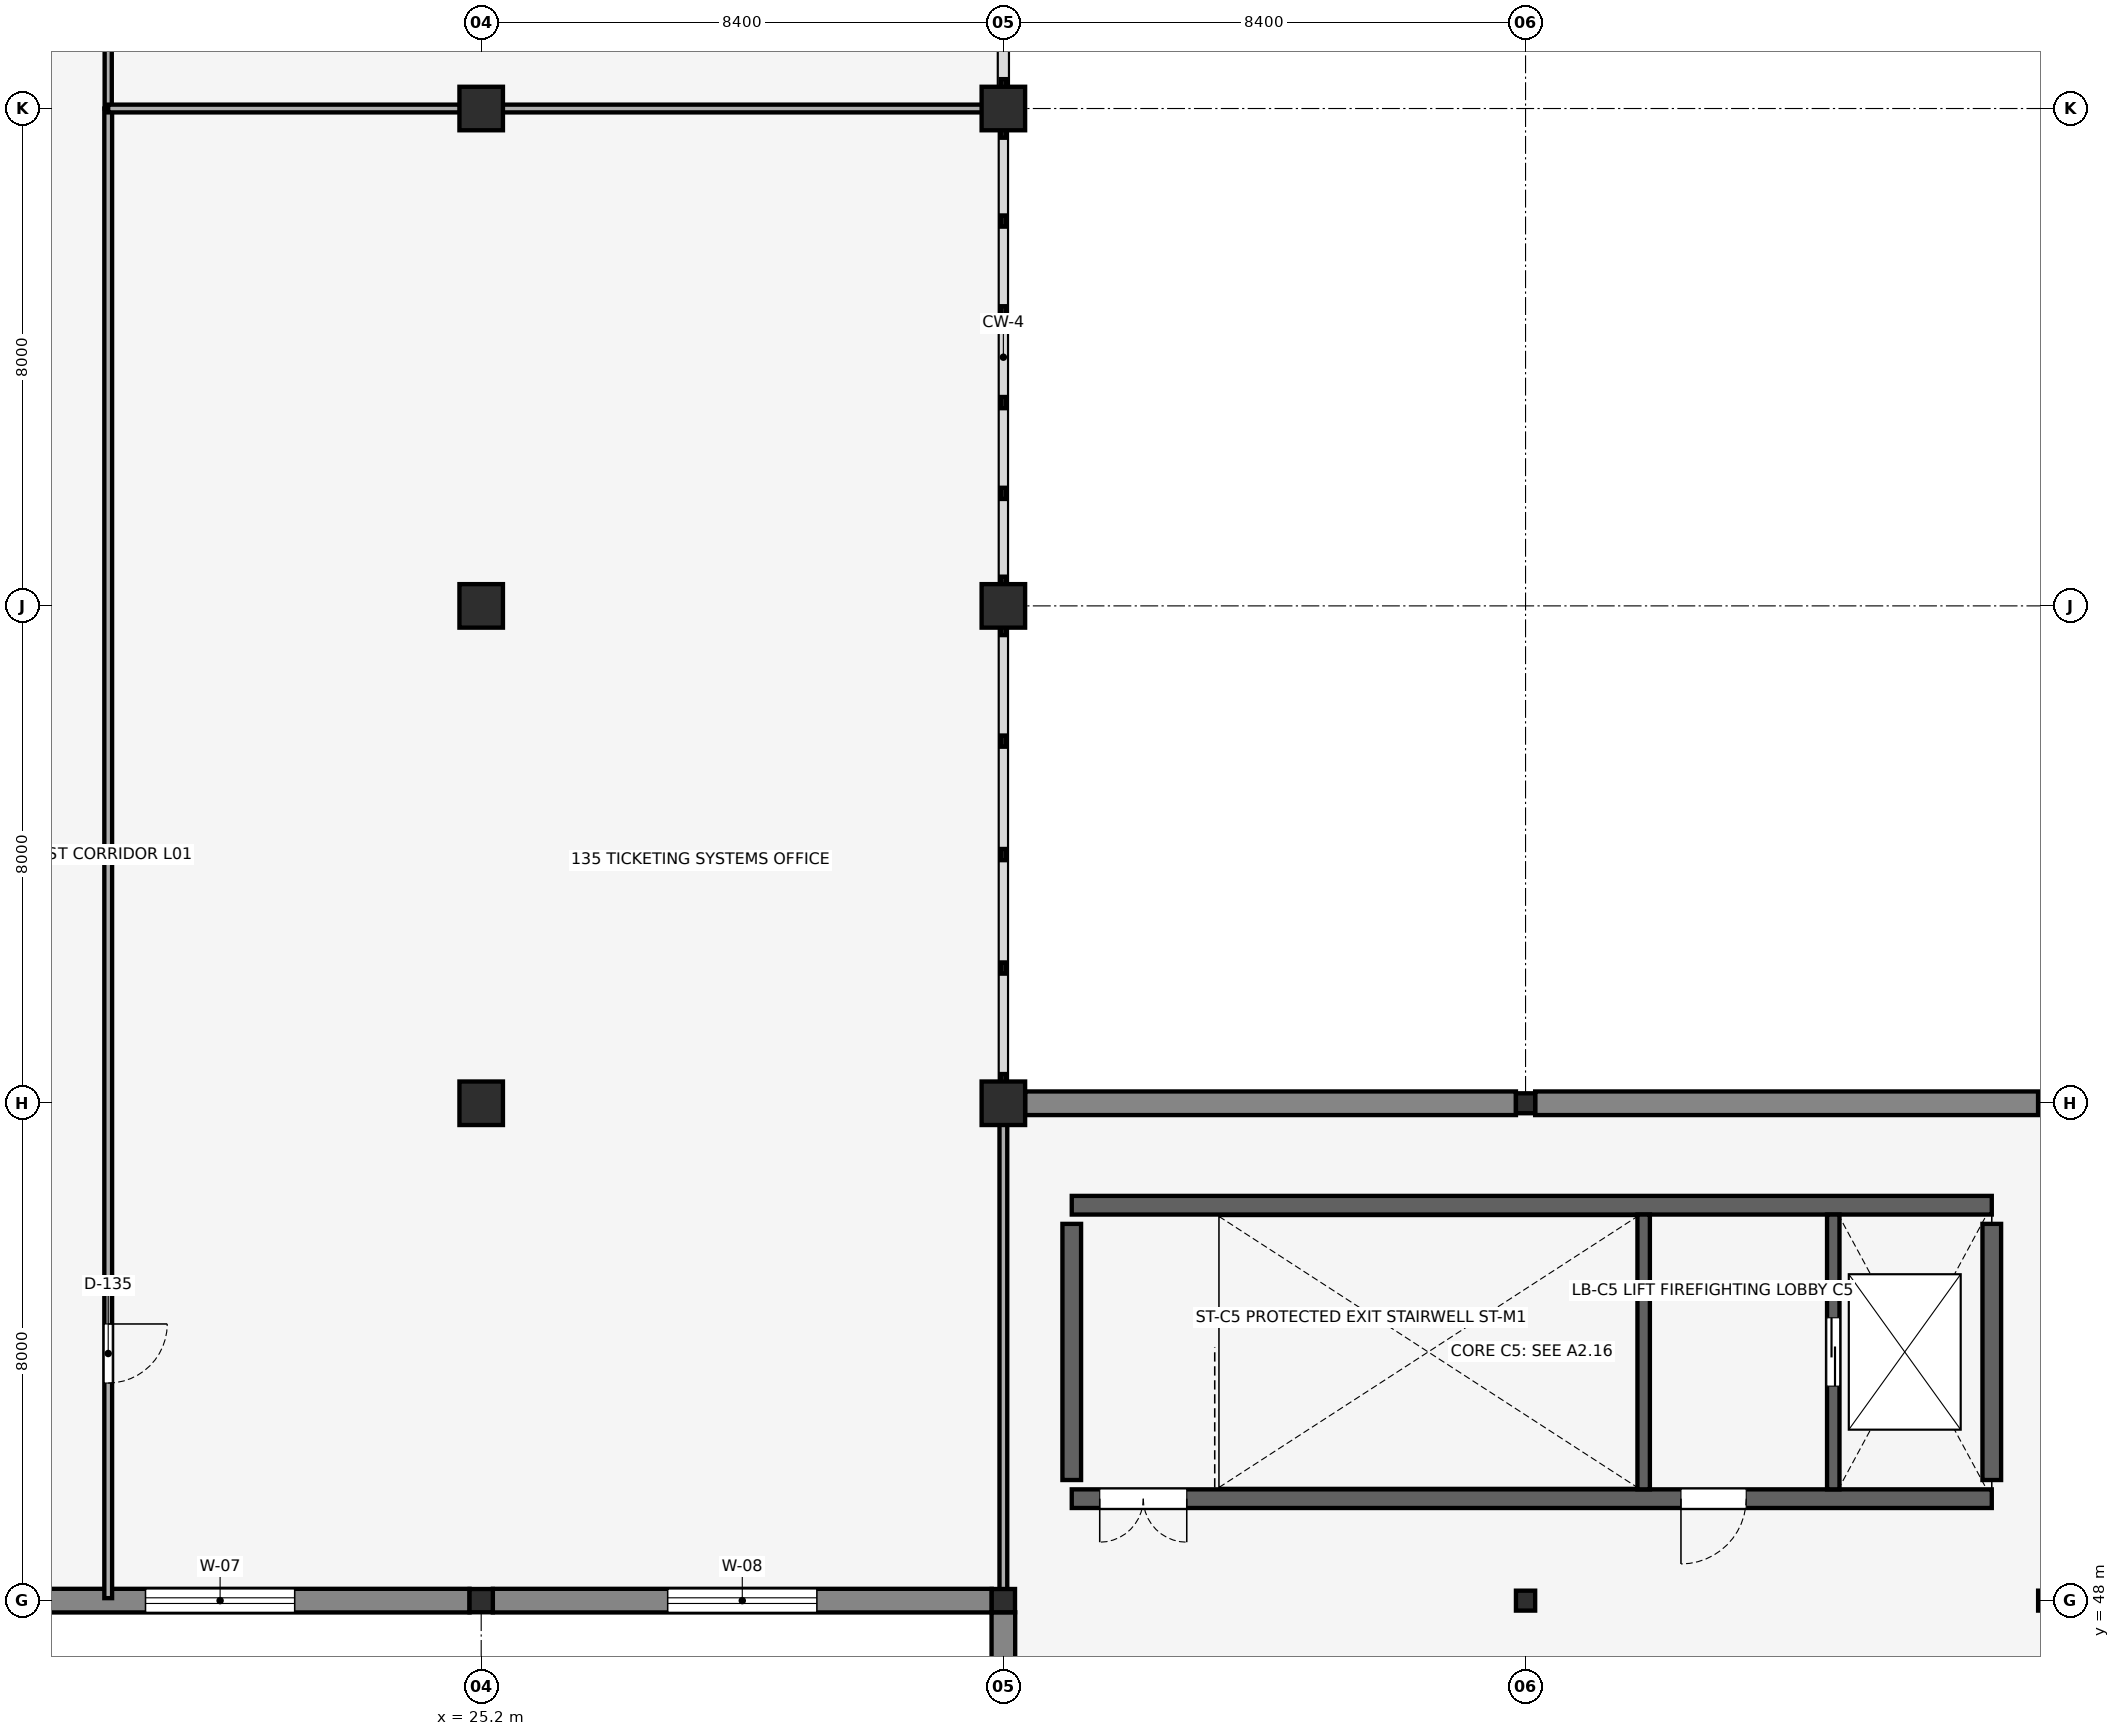
"""IFC4 building model, lengths in metres.
Left out: names, types, materials, properties, quantities, classifications, styles, units other than length and angle.
Written with IfcOpenShell. Run it as: python <this file> out.ifc"""

import sys

from ifc_helpers import new_model, si_unit, direction, frame, frame_2d, origin, origin_2d, place, context, subcontext, project, spatial, rectangle, i_section, extrude, element, fill, save


model = new_model("IFC4")
c1 = context("Model", 3, precision=1e-05, world=origin(), true_north=direction((0.0, 1.0)))
c2 = subcontext(c1, "Body", "Model", "MODEL_VIEW")
j1 = project(units=[si_unit("LENGTHUNIT", "METRE"), si_unit("PLANEANGLEUNIT", "RADIAN")], contexts=[c1])
p1 = place(None, origin())
s1 = spatial("IfcSite", under=j1, at=p1, CompositionType="ELEMENT")
p2 = place(p1, origin())
s2 = spatial("IfcBuilding", under=s1, at=p2, CompositionType="ELEMENT")
p3 = place(p2, frame((0.0, 0.0, 5.44)))
s3 = spatial("IfcBuildingStorey", under=s2, at=p3, CompositionType="ELEMENT", Elevation=5.44)
p4 = place(p3, frame((34.7, 49.64, 0.0), z_axis=(0.0, 0.0, 1.0), x_axis=(1.0, 0.0, 0.0)))
e1 = element("IfcWall", 1, at=p4, inside=s3, PredefinedType="SHEAR", context=c2, shape_type="SweptSolid", body=[
    extrude(rectangle(XDim=14.8, YDim=0.3, at=frame_2d((7.4, 0.0))), origin(), (0.0, 0.0, 1.0), 3.8),
])
p5 = place(p4, frame((1.85, 0.0, 0.0), z_axis=(0.0, 0.0, 1.0), x_axis=(-1.0, 0.0, 0.0)))
e2 = element("IfcOpeningElement", 2, at=p5, cuts=e1, PredefinedType="OPENING", context=c2, shape_type="SweptSolid", body=[
    extrude(rectangle(XDim=1.4, YDim=2.15, at=frame_2d((0.7, 1.075))), frame((0.0, 0.16, 0.0), z_axis=(0.0, -1.0, 0.0), x_axis=(1.0, 0.0, 0.0)), (0.0, 0.0, 1.0), 0.32),
])
p6 = place(p4, frame((10.85, 0.0, 0.0), z_axis=(0.0, 0.0, 1.0), x_axis=(-1.0, 0.0, 0.0)))
e3 = element("IfcOpeningElement", 3, at=p6, cuts=e1, PredefinedType="OPENING", context=c2, shape_type="SweptSolid", body=[
    extrude(rectangle(XDim=1.05, YDim=2.15, at=frame_2d((0.525, 1.075))), frame((0.0, 0.16, 0.0), z_axis=(0.0, -1.0, 0.0), x_axis=(1.0, 0.0, 0.0)), (0.0, 0.0, 1.0), 0.32),
])
p7 = place(p3, frame((34.7, 54.36, 0.0), z_axis=(0.0, 0.0, 1.0), x_axis=(1.0, 0.0, 0.0)))
e4 = element("IfcWall", 4, at=p7, inside=s3, PredefinedType="SHEAR", context=c2, shape_type="SweptSolid", body=[
    extrude(rectangle(XDim=14.8, YDim=0.3, at=frame_2d((7.4, 0.0))), origin(), (0.0, 0.0, 1.0), 3.8),
])
for number, where, z_axis, x_axis in (
    (5, (34.7, 49.94, 0.0), (0.0, 0.0, 1.0), (0.0, 1.0, 0.0)),
    (6, (49.5, 49.94, 0.0), (0.0, 0.0, 1.0), (0.0, 1.0, 0.0)),
):
    element("IfcWall", number, at=place(p3, frame(where, z_axis=z_axis, x_axis=x_axis)), inside=s3, PredefinedType="SHEAR", context=c2, shape_type="SweptSolid", body=[
        extrude(rectangle(XDim=4.12, YDim=0.3, at=frame_2d((2.06, 0.0))), origin(), (0.0, 0.0, 1.0), 3.8),
    ])
p8 = place(p3, frame((25.2, 48.0, 0.0), z_axis=(0.0, 0.0, 1.0), x_axis=(1.0, 0.0, 0.0)))
e7 = element("IfcColumn", 7, at=p8, inside=s3, PredefinedType="COLUMN", context=c2, shape_type="SweptSolid", body=[
    extrude(i_section(OverallWidth=0.375, OverallDepth=0.375, WebThickness=0.017, FlangeThickness=0.027, FilletRadius=0.015, at=origin_2d()), origin(), (0.0, 0.0, 1.0), 3.8),
])
for number, where, z_axis, x_axis in (
    (8, (25.2, 56.0, 0.0), (0.0, 0.0, 1.0), (1.0, 0.0, 0.0)),
    (9, (25.2, 64.0, 0.0), (0.0, 0.0, 1.0), (1.0, 0.0, 0.0)),
    (10, (25.2, 72.0, 0.0), (0.0, 0.0, 1.0), (1.0, 0.0, 0.0)),
):
    element("IfcColumn", number, at=place(p3, frame(where, z_axis=z_axis, x_axis=x_axis)), inside=s3, PredefinedType="COLUMN", context=c2, shape_type="SweptSolid", body=[
        extrude(rectangle(XDim=0.7, YDim=0.7, at=origin_2d()), origin(), (0.0, 0.0, 1.0), 3.8),
    ])
p9 = place(p3, frame((33.6, 48.0, 0.0), z_axis=(0.0, 0.0, 1.0), x_axis=(1.0, 0.0, 0.0)))
e11 = element("IfcColumn", 11, at=p9, inside=s3, PredefinedType="COLUMN", context=c2, shape_type="SweptSolid", body=[
    extrude(i_section(OverallWidth=0.375, OverallDepth=0.375, WebThickness=0.017, FlangeThickness=0.027, FilletRadius=0.015, at=origin_2d()), origin(), (0.0, 0.0, 1.0), 3.8),
])
for number, where, z_axis, x_axis in (
    (12, (33.6, 56.0, 0.0), (0.0, 0.0, 1.0), (1.0, 0.0, 0.0)),
    (13, (33.6, 64.0, 0.0), (0.0, 0.0, 1.0), (1.0, 0.0, 0.0)),
    (14, (33.6, 72.0, 0.0), (0.0, 0.0, 1.0), (1.0, 0.0, 0.0)),
):
    element("IfcColumn", number, at=place(p3, frame(where, z_axis=z_axis, x_axis=x_axis)), inside=s3, PredefinedType="COLUMN", context=c2, shape_type="SweptSolid", body=[
        extrude(rectangle(XDim=0.7, YDim=0.7, at=origin_2d()), origin(), (0.0, 0.0, 1.0), 3.8),
    ])
for number, where, z_axis, x_axis in (
    (15, (42.0, 48.0, 0.0), (0.0, 0.0, 1.0), (1.0, 0.0, 0.0)),
    (16, (42.0, 56.0, 0.0), (0.0, 0.0, 1.0), (1.0, 0.0, 0.0)),
    (17, (50.4, 48.0, 0.0), (0.0, 0.0, 1.0), (1.0, 0.0, 0.0)),
    (18, (50.4, 56.0, 0.0), (0.0, 0.0, 1.0), (1.0, 0.0, 0.0)),
):
    element("IfcColumn", number, at=place(p3, frame(where, z_axis=z_axis, x_axis=x_axis)), inside=s3, PredefinedType="COLUMN", context=c2, shape_type="SweptSolid", body=[
        extrude(i_section(OverallWidth=0.309, OverallDepth=0.321, WebThickness=0.014, FlangeThickness=0.022, FilletRadius=0.015, at=origin_2d()), origin(), (0.0, 0.0, 1.0), 3.8),
    ])
p10 = place(p3, frame((33.6, 40.187, 0.0), z_axis=(0.0, 0.0, 1.0), x_axis=(0.0, 1.0, 0.0)))
e19 = element("IfcWall", 19, at=p10, inside=s3, PredefinedType="SOLIDWALL", context=c2, shape_type="SweptSolid", body=[
    extrude(rectangle(XDim=7.625, YDim=0.38, at=frame_2d((3.813, 0.0))), origin(), (0.0, 0.0, 1.0), 3.442),
])
p11 = place(p10, frame((2.313, 0.0, 0.9), z_axis=(0.0, 0.0, 1.0), x_axis=(1.0, 0.0, 0.0)))
e20 = element("IfcOpeningElement", 20, at=p11, cuts=e19, PredefinedType="OPENING", context=c2, shape_type="SweptSolid", body=[
    extrude(rectangle(XDim=3.0, YDim=1.65, at=frame_2d((1.5, 0.825))), frame((0.0, 0.2, 0.0), z_axis=(0.0, -1.0, 0.0), x_axis=(1.0, 0.0, 0.0)), (0.0, 0.0, 1.0), 0.4),
])
p12 = place(p3, frame((16.987, 48.0, 0.0), z_axis=(0.0, 0.0, 1.0), x_axis=(1.0, 0.0, 0.0)))
e21 = element("IfcWall", 21, at=p12, inside=s3, PredefinedType="SOLIDWALL", context=c2, shape_type="SweptSolid", body=[
    extrude(rectangle(XDim=8.025, YDim=0.38, at=frame_2d((4.013, 0.0))), origin(), (0.0, 0.0, 1.0), 3.45),
])
p13 = place(p12, frame((2.813, 0.0, 0.9), z_axis=(0.0, 0.0, 1.0), x_axis=(1.0, 0.0, 0.0)))
e22 = element("IfcOpeningElement", 22, at=p13, cuts=e21, PredefinedType="OPENING", context=c2, shape_type="SweptSolid", body=[
    extrude(rectangle(XDim=2.4, YDim=1.75, at=frame_2d((1.2, 0.875))), frame((0.0, 0.2, 0.0), z_axis=(0.0, -1.0, 0.0), x_axis=(1.0, 0.0, 0.0)), (0.0, 0.0, 1.0), 0.4),
])
p14 = place(p3, frame((25.387, 48.0, 0.0), z_axis=(0.0, 0.0, 1.0), x_axis=(1.0, 0.0, 0.0)))
e23 = element("IfcWall", 23, at=p14, inside=s3, PredefinedType="SOLIDWALL", context=c2, shape_type="SweptSolid", body=[
    extrude(rectangle(XDim=8.025, YDim=0.38, at=frame_2d((4.013, 0.0))), origin(), (0.0, 0.0, 1.0), 3.45),
])
p15 = place(p14, frame((2.813, 0.0, 0.9), z_axis=(0.0, 0.0, 1.0), x_axis=(1.0, 0.0, 0.0)))
e24 = element("IfcOpeningElement", 24, at=p15, cuts=e23, PredefinedType="OPENING", context=c2, shape_type="SweptSolid", body=[
    extrude(rectangle(XDim=2.4, YDim=1.5, at=frame_2d((1.2, 0.75))), frame((0.0, 0.2, 0.0), z_axis=(0.0, -1.0, 0.0), x_axis=(1.0, 0.0, 0.0)), (0.0, 0.0, 1.0), 0.4),
])
p16 = place(p3, frame((33.95, 56.0, 0.0), z_axis=(0.0, 0.0, 1.0), x_axis=(1.0, 0.0, 0.0)))
e25 = element("IfcWall", 25, at=p16, inside=s3, PredefinedType="SOLIDWALL", context=c2, shape_type="SweptSolid", body=[
    extrude(rectangle(XDim=7.896, YDim=0.38, at=frame_2d((3.948, 0.0))), origin(), (0.0, 0.0, 1.0), 3.45),
])
p17 = place(p3, frame((42.155, 56.0, 0.0), z_axis=(0.0, 0.0, 1.0), x_axis=(1.0, 0.0, 0.0)))
e26 = element("IfcWall", 26, at=p17, inside=s3, PredefinedType="SOLIDWALL", context=c2, shape_type="SweptSolid", body=[
    extrude(rectangle(XDim=8.091, YDim=0.38, at=frame_2d((4.045, 0.0))), origin(), (0.0, 0.0, 1.0), 3.45),
])
p18 = place(p3, frame((43.9, 49.79, 0.0), z_axis=(0.0, 0.0, 1.0), x_axis=(0.0, 1.0, 0.0)))
e27 = element("IfcWall", 27, at=p18, inside=s3, PredefinedType="SHEAR", context=c2, shape_type="SweptSolid", body=[
    extrude(rectangle(XDim=4.42, YDim=0.2, at=frame_2d((2.21, 0.0))), origin(), (0.0, 0.0, 1.0), 3.8),
])
p19 = place(p3, frame((46.95, 49.79, 0.0), z_axis=(0.0, 0.0, 1.0), x_axis=(0.0, 1.0, 0.0)))
e28 = element("IfcWall", 28, at=p19, inside=s3, PredefinedType="SHEAR", context=c2, shape_type="SweptSolid", body=[
    extrude(rectangle(XDim=4.42, YDim=0.2, at=frame_2d((2.21, 0.0))), origin(), (0.0, 0.0, 1.0), 3.8),
])
p20 = place(p19, frame((1.66, 0.0, 0.0), z_axis=(0.0, 0.0, 1.0), x_axis=(1.0, 0.0, 0.0)))
e29 = element("IfcOpeningElement", 29, at=p20, cuts=e28, PredefinedType="OPENING", context=c2, shape_type="SweptSolid", body=[
    extrude(rectangle(XDim=1.1, YDim=2.15, at=frame_2d((0.55, 1.075))), frame((0.0, 0.11, 0.0), z_axis=(0.0, -1.0, 0.0), x_axis=(1.0, 0.0, 0.0)), (0.0, 0.0, 1.0), 0.22),
])
p21 = place(p3, frame((19.2, 48.04, 0.0), z_axis=(0.0, 0.0, 1.0), x_axis=(0.0, 1.0, 0.0)))
e30 = element("IfcWall", 30, at=p21, inside=s3, PredefinedType="PARTITIONING", context=c2, shape_type="SweptSolid", body=[
    extrude(rectangle(XDim=23.96, YDim=0.125, at=frame_2d((11.98, 0.0))), origin(), (0.0, 0.0, 1.0), 3.8),
])
p22 = place(p21, frame((4.41, 0.0, 0.0), z_axis=(0.0, 0.0, 1.0), x_axis=(-1.0, 0.0, 0.0)))
e31 = element("IfcOpeningElement", 31, at=p22, cuts=e30, PredefinedType="OPENING", context=c2, shape_type="SweptSolid", body=[
    extrude(rectangle(XDim=0.95, YDim=2.15, at=frame_2d((0.475, 1.075))), frame((0.0, 0.073, 0.0), z_axis=(0.0, -1.0, 0.0), x_axis=(1.0, 0.0, 0.0)), (0.0, 0.0, 1.0), 0.145),
])
p23 = place(p3, frame((19.2, 72.0, 0.0), z_axis=(0.0, 0.0, 1.0), x_axis=(0.0, 1.0, 0.0)))
e32 = element("IfcWall", 32, at=p23, inside=s3, PredefinedType="PARTITIONING", context=c2, shape_type="SweptSolid", body=[
    extrude(rectangle(XDim=16.0, YDim=0.115, at=frame_2d((8.0, 0.0))), origin(), (0.0, 0.0, 1.0), 3.8),
])
p24 = place(p23, frame((4.42, 0.0, 0.0), z_axis=(0.0, 0.0, 1.0), x_axis=(-1.0, 0.0, 0.0)))
e33 = element("IfcOpeningElement", 33, at=p24, cuts=e32, PredefinedType="OPENING", context=c2, shape_type="SweptSolid", body=[
    extrude(rectangle(XDim=0.92, YDim=2.12, at=frame_2d((0.46, 1.06))), frame((0.0, 0.067, 0.0), z_axis=(0.0, -1.0, 0.0), x_axis=(1.0, 0.0, 0.0)), (0.0, 0.0, 1.0), 0.135),
])
p25 = place(p3, frame((33.6, 48.177, 0.0), z_axis=(0.0, 0.0, 1.0), x_axis=(0.0, 1.0, 0.0)))
e34 = element("IfcWall", 34, at=p25, inside=s3, PredefinedType="PARTITIONING", context=c2, shape_type="SweptSolid", body=[
    extrude(rectangle(XDim=7.483, YDim=0.125, at=frame_2d((3.741, 0.0))), origin(), (0.0, 0.0, 1.0), 3.337),
])
p26 = place(p3, frame((19.2, 72.0, 0.0), z_axis=(0.0, 0.0, 1.0), x_axis=(1.0, 0.0, 0.0)))
e35 = element("IfcWall", 35, at=p26, inside=s3, PredefinedType="PARTITIONING", context=c2, shape_type="SweptSolid", body=[
    extrude(rectangle(XDim=5.66, YDim=0.125, at=frame_2d((2.83, 0.0))), origin(), (0.0, 0.0, 1.0), 3.26),
])
p27 = place(p3, frame((25.54, 72.0, 0.0), z_axis=(0.0, 0.0, 1.0), x_axis=(1.0, 0.0, 0.0)))
e36 = element("IfcWall", 36, at=p27, inside=s3, PredefinedType="PARTITIONING", context=c2, shape_type="SweptSolid", body=[
    extrude(rectangle(XDim=7.72, YDim=0.125, at=frame_2d((3.86, 0.0))), origin(), (0.0, 0.0, 1.0), 3.26),
])
p28 = place(p13, origin())
e37 = element("IfcWindow", 37, at=p28, inside=s3, PartitioningType="DOUBLE_PANEL_VERTICAL", PredefinedType="WINDOW", context=c2, shape_type="SweptSolid", body=[
    extrude(rectangle(XDim=2.4, YDim=1.75, at=frame_2d((1.2, 0.875))), frame((0.0, 0.03, 0.0), z_axis=(0.0, -1.0, 0.0), x_axis=(1.0, 0.0, 0.0)), (0.0, 0.0, 1.0), 0.06),
])
fill(e22, e37)
p29 = place(p15, origin())
e38 = element("IfcWindow", 38, at=p29, inside=s3, PartitioningType="DOUBLE_PANEL_VERTICAL", PredefinedType="WINDOW", context=c2, shape_type="SweptSolid", body=[
    extrude(rectangle(XDim=2.4, YDim=1.5, at=frame_2d((1.2, 0.75))), frame((0.0, 0.03, 0.0), z_axis=(0.0, -1.0, 0.0), x_axis=(1.0, 0.0, 0.0)), (0.0, 0.0, 1.0), 0.06),
])
fill(e24, e38)
p30 = place(p5, origin())
e39 = element("IfcDoor", 39, at=p30, inside=s3, OperationType="DOUBLE_DOOR_SINGLE_SWING", PredefinedType="DOOR", context=c2, shape_type="SweptSolid", body=[
    extrude(rectangle(XDim=1.4, YDim=2.15, at=frame_2d((0.7, 1.075))), frame((0.0, 0.025, 0.0), z_axis=(0.0, -1.0, 0.0), x_axis=(1.0, 0.0, 0.0)), (0.0, 0.0, 1.0), 0.05),
])
fill(e2, e39)
p31 = place(p6, origin())
e40 = element("IfcDoor", 40, at=p31, inside=s3, OperationType="SINGLE_SWING_RIGHT", PredefinedType="DOOR", context=c2, shape_type="SweptSolid", body=[
    extrude(rectangle(XDim=1.05, YDim=2.15, at=frame_2d((0.525, 1.075))), frame((0.0, 0.025, 0.0), z_axis=(0.0, -1.0, 0.0), x_axis=(1.0, 0.0, 0.0)), (0.0, 0.0, 1.0), 0.05),
])
fill(e3, e40)
p32 = place(p20, origin())
e41 = element("IfcDoor", 41, at=p32, inside=s3, OperationType="DOUBLE_DOOR_SLIDING", PredefinedType="DOOR", context=c2, shape_type="SweptSolid", body=[
    extrude(rectangle(XDim=1.1, YDim=2.15, at=frame_2d((0.55, 1.075))), frame((0.0, 0.025, 0.0), z_axis=(0.0, -1.0, 0.0), x_axis=(1.0, 0.0, 0.0)), (0.0, 0.0, 1.0), 0.05),
])
fill(e29, e41)
p33 = place(p22, origin())
e42 = element("IfcDoor", 42, at=p33, inside=s3, OperationType="SINGLE_SWING_LEFT", PredefinedType="DOOR", context=c2, shape_type="SweptSolid", body=[
    extrude(rectangle(XDim=0.95, YDim=2.15, at=frame_2d((0.475, 1.075))), frame((0.0, 0.025, 0.0), z_axis=(0.0, -1.0, 0.0), x_axis=(1.0, 0.0, 0.0)), (0.0, 0.0, 1.0), 0.05),
])
fill(e31, e42)
save(model, sys.argv[1])
